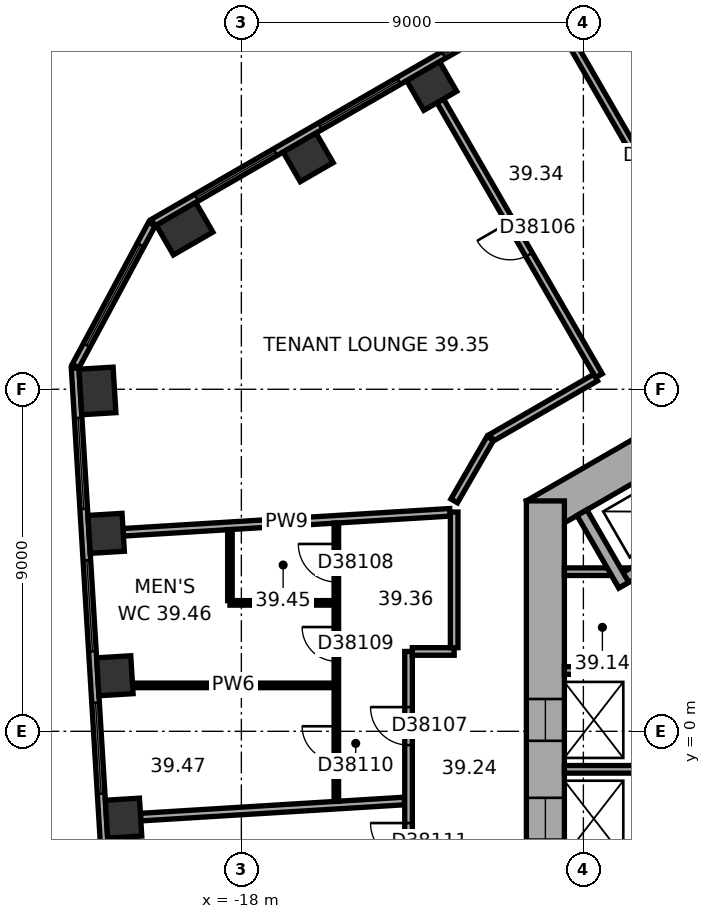
"""IFC4 building model, lengths in metres.
Left out: names, types, materials, properties, quantities, classifications, styles, units other than length and angle.
Written with IfcOpenShell. Run it as: python <this file> out.ifc"""

import sys

from ifc_helpers import new_model, si_unit, direction, frame, frame_2d, origin, origin_2d, place, context, subcontext, project, spatial, rectangle, extrude, element, fill, save


model = new_model("IFC4")
c1 = context("Model", 3, precision=1e-05, world=origin(), true_north=direction((0.0, 1.0)))
c2 = subcontext(c1, "Body", "Model", "MODEL_VIEW")
j1 = project(units=[si_unit("LENGTHUNIT", "METRE"), si_unit("PLANEANGLEUNIT", "RADIAN")], contexts=[c1])
p1 = place(None, origin())
s1 = spatial("IfcSite", under=j1, at=p1, CompositionType="ELEMENT")
p2 = place(p1, origin())
s2 = spatial("IfcBuilding", under=s1, at=p2, CompositionType="ELEMENT")
p3 = place(p2, frame((0.0, 0.0, 161.4)))
s3 = spatial("IfcBuildingStorey", under=s2, at=p3, CompositionType="ELEMENT", Elevation=161.4)
for number, where, z_axis, x_axis in (
    (1, (-12.991, 16.979, 0.0), (0.0, 0.0, 1.0), (-0.866, -0.5, 0.0)),
    (2, (-16.242, 15.102, 0.0), (0.0, 0.0, 1.0), (-0.866, -0.5, 0.0)),
):
    element("IfcColumn", number, at=place(p3, frame(where, z_axis=z_axis, x_axis=x_axis)), inside=s3, PredefinedType="COLUMN", context=c2, shape_type="SweptSolid", body=[
        extrude(rectangle(XDim=1.0, YDim=0.9, at=origin_2d()), origin(), (0.0, 0.0, 1.0), 3.7),
    ])
for number, where, z_axis, x_axis in (
    (3, (-19.494, 13.225, 0.0), (0.0, 0.0, 1.0), (-0.866, -0.5, 0.0)),
    (4, (-21.787, 8.956, 0.0), (0.0, 0.0, 1.0), (0.061, -0.998, 0.0)),
):
    element("IfcColumn", number, at=place(p3, frame(where, z_axis=z_axis, x_axis=x_axis)), inside=s3, PredefinedType="COLUMN", context=c2, shape_type="SweptSolid", body=[
        extrude(rectangle(XDim=1.2, YDim=0.9, at=origin_2d()), origin(), (0.0, 0.0, 1.0), 3.7),
    ])
for number, where, z_axis, x_axis in (
    (5, (-21.558, 5.209, 0.0), (0.0, 0.0, 1.0), (0.061, -0.998, 0.0)),
    (6, (-21.329, 1.462, 0.0), (0.0, 0.0, 1.0), (0.061, -0.998, 0.0)),
    (7, (-21.1, -2.285, 0.0), (0.0, 0.0, 1.0), (0.061, -0.998, 0.0)),
):
    element("IfcColumn", number, at=place(p3, frame(where, z_axis=z_axis, x_axis=x_axis)), inside=s3, PredefinedType="COLUMN", context=c2, shape_type="SweptSolid", body=[
        extrude(rectangle(XDim=1.0, YDim=0.9, at=origin_2d()), origin(), (0.0, 0.0, 1.0), 3.7),
    ])
p4 = place(p3, frame((0.25, 11.691, 0.0), z_axis=(0.0, 0.0, 1.0), x_axis=(-0.866022616891, -0.50000482701, 0.0)))
e8 = element("IfcWall", 8, at=p4, inside=s3, PredefinedType="SHEAR", context=c2, shape_type="SweptSolid", body=[
    extrude(rectangle(XDim=12.125, YDim=1.0, at=frame_2d((6.062, 0.0))), origin(), (0.0, 0.0, 1.0), 3.7),
])
p5 = place(p4, frame((6.262, 0.0, 0.0)))
e9 = element("IfcOpeningElement", 9, at=p5, cuts=e8, PredefinedType="OPENING", context=c2, shape_type="SweptSolid", body=[
    extrude(rectangle(XDim=1.5, YDim=2.1, at=frame_2d((0.75, 1.05))), frame((0.0, 0.51, 0.0), z_axis=(0.0, -1.0, 0.0), x_axis=(1.0, 0.0, 0.0)), (0.0, 0.0, 1.0), 1.02),
])
p6 = place(p4, frame((3.112, 0.0, 0.0)))
e10 = element("IfcOpeningElement", 10, at=p6, cuts=e8, PredefinedType="OPENING", context=c2, shape_type="SweptSolid", body=[
    extrude(rectangle(XDim=0.9, YDim=2.1, at=frame_2d((0.45, 1.05))), frame((0.0, 0.51, 0.0), z_axis=(0.0, -1.0, 0.0), x_axis=(1.0, 0.0, 0.0)), (0.0, 0.0, 1.0), 1.02),
])
p7 = place(p3, frame((-10.0, 6.062, 0.0), z_axis=(0.0, 0.0, 1.0), x_axis=(0.0, -1.0, 0.0)))
e11 = element("IfcWall", 11, at=p7, inside=s3, PredefinedType="SHEAR", context=c2, shape_type="SweptSolid", body=[
    extrude(rectangle(XDim=12.125, YDim=1.0, at=frame_2d((6.062, 0.0))), origin(), (0.0, 0.0, 1.0), 3.7),
])
p8 = place(p7, frame((5.212, 0.0, 0.0)))
e12 = element("IfcOpeningElement", 12, at=p8, cuts=e11, PredefinedType="OPENING", context=c2, shape_type="SweptSolid", body=[
    extrude(rectangle(XDim=1.1, YDim=2.1, at=frame_2d((0.55, 1.05))), frame((0.0, 0.51, 0.0), z_axis=(0.0, -1.0, 0.0), x_axis=(1.0, 0.0, 0.0)), (0.0, 0.0, 1.0), 1.02),
])
p9 = place(p7, frame((7.812, 0.0, 0.0)))
e13 = element("IfcOpeningElement", 13, at=p9, cuts=e11, PredefinedType="OPENING", context=c2, shape_type="SweptSolid", body=[
    extrude(rectangle(XDim=1.1, YDim=2.1, at=frame_2d((0.55, 1.05))), frame((0.0, 0.51, 0.0), z_axis=(0.0, -1.0, 0.0), x_axis=(1.0, 0.0, 0.0)), (0.0, 0.0, 1.0), 1.02),
])
p10 = place(p3, frame((-2.961, 23.405, 0.0), z_axis=(0.0, 0.0, 1.0), x_axis=(-0.866023315909, -0.500003616288, 0.0)))
e14 = element("IfcWall", 14, at=p10, inside=s3, PredefinedType="STANDARD", context=c2, shape_type="SweptSolid", body=[
    extrude(rectangle(XDim=20.044, YDim=0.2, at=frame_2d((10.022, 0.0))), origin(), (0.0, 0.0, 1.0), 3.7),
])
p11 = place(p10, frame((1.314, 0.0, 0.9)))
e15 = element("IfcOpeningElement", 15, at=p11, cuts=e14, PredefinedType="OPENING", context=c2, shape_type="SweptSolid", body=[
    extrude(rectangle(XDim=2.4, YDim=2.0, at=frame_2d((1.2, 1.0))), frame((0.0, 0.11, 0.0), z_axis=(0.0, -1.0, 0.0), x_axis=(1.0, 0.0, 0.0)), (0.0, 0.0, 1.0), 0.22),
])
p12 = place(p10, frame((5.069, 0.0, 0.9)))
e16 = element("IfcOpeningElement", 16, at=p12, cuts=e14, PredefinedType="OPENING", context=c2, shape_type="SweptSolid", body=[
    extrude(rectangle(XDim=2.4, YDim=2.0, at=frame_2d((1.2, 1.0))), frame((0.0, 0.11, 0.0), z_axis=(0.0, -1.0, 0.0), x_axis=(1.0, 0.0, 0.0)), (0.0, 0.0, 1.0), 0.22),
])
p13 = place(p10, frame((8.823, 0.0, 0.9)))
e17 = element("IfcOpeningElement", 17, at=p13, cuts=e14, PredefinedType="OPENING", context=c2, shape_type="SweptSolid", body=[
    extrude(rectangle(XDim=2.4, YDim=2.0, at=frame_2d((1.2, 1.0))), frame((0.0, 0.11, 0.0), z_axis=(0.0, -1.0, 0.0), x_axis=(1.0, 0.0, 0.0)), (0.0, 0.0, 1.0), 0.22),
])
p14 = place(p10, frame((12.577, 0.0, 0.9)))
e18 = element("IfcOpeningElement", 18, at=p14, cuts=e14, PredefinedType="OPENING", context=c2, shape_type="SweptSolid", body=[
    extrude(rectangle(XDim=2.4, YDim=2.0, at=frame_2d((1.2, 1.0))), frame((0.0, 0.11, 0.0), z_axis=(0.0, -1.0, 0.0), x_axis=(1.0, 0.0, 0.0)), (0.0, 0.0, 1.0), 0.22),
])
p15 = place(p10, frame((16.331, 0.0, 0.9)))
e19 = element("IfcOpeningElement", 19, at=p15, cuts=e14, PredefinedType="OPENING", context=c2, shape_type="SweptSolid", body=[
    extrude(rectangle(XDim=2.4, YDim=2.0, at=frame_2d((1.2, 1.0))), frame((0.0, 0.11, 0.0), z_axis=(0.0, -1.0, 0.0), x_axis=(1.0, 0.0, 0.0)), (0.0, 0.0, 1.0), 0.22),
])
p16 = place(p3, frame((-20.357, 13.344, 0.0), z_axis=(0.0, 0.0, 1.0), x_axis=(-0.473288913494, -0.880907262068, 0.0)))
e20 = element("IfcWall", 20, at=p16, inside=s3, PredefinedType="STANDARD", context=c2, shape_type="SweptSolid", body=[
    extrude(rectangle(XDim=4.238, YDim=0.2, at=frame_2d((2.119, 0.0))), origin(), (0.0, 0.0, 1.0), 3.7),
])
p17 = place(p16, frame((0.619, 0.0, 0.9)))
e21 = element("IfcOpeningElement", 21, at=p17, cuts=e20, PredefinedType="OPENING", context=c2, shape_type="SweptSolid", body=[
    extrude(rectangle(XDim=3.0, YDim=2.0, at=frame_2d((1.5, 1.0))), frame((0.0, 0.11, 0.0), z_axis=(0.0, -1.0, 0.0), x_axis=(1.0, 0.0, 0.0)), (0.0, 0.0, 1.0), 0.22),
])
p18 = place(p3, frame((-22.375, 9.557, 0.0), z_axis=(0.0, 0.0, 1.0), x_axis=(0.061036015339, -0.998135564356, 0.0)))
e22 = element("IfcWall", 22, at=p18, inside=s3, PredefinedType="STANDARD", context=c2, shape_type="SweptSolid", body=[
    extrude(rectangle(XDim=20.044, YDim=0.2, at=frame_2d((10.022, 0.0))), origin(), (0.0, 0.0, 1.0), 3.7),
])
p19 = place(p18, frame((1.313, 0.0, 0.9)))
e23 = element("IfcOpeningElement", 23, at=p19, cuts=e22, PredefinedType="OPENING", context=c2, shape_type="SweptSolid", body=[
    extrude(rectangle(XDim=2.4, YDim=2.0, at=frame_2d((1.2, 1.0))), frame((0.0, 0.11, 0.0), z_axis=(0.0, -1.0, 0.0), x_axis=(1.0, 0.0, 0.0)), (0.0, 0.0, 1.0), 0.22),
])
p20 = place(p18, frame((5.067, 0.0, 0.9)))
e24 = element("IfcOpeningElement", 24, at=p20, cuts=e22, PredefinedType="OPENING", context=c2, shape_type="SweptSolid", body=[
    extrude(rectangle(XDim=2.4, YDim=2.0, at=frame_2d((1.2, 1.0))), frame((0.0, 0.11, 0.0), z_axis=(0.0, -1.0, 0.0), x_axis=(1.0, 0.0, 0.0)), (0.0, 0.0, 1.0), 0.22),
])
p21 = place(p18, frame((8.821, 0.0, 0.9)))
e25 = element("IfcOpeningElement", 25, at=p21, cuts=e22, PredefinedType="OPENING", context=c2, shape_type="SweptSolid", body=[
    extrude(rectangle(XDim=2.4, YDim=2.0, at=frame_2d((1.2, 1.0))), frame((0.0, 0.11, 0.0), z_axis=(0.0, -1.0, 0.0), x_axis=(1.0, 0.0, 0.0)), (0.0, 0.0, 1.0), 0.22),
])
p22 = place(p18, frame((12.575, 0.0, 0.9)))
e26 = element("IfcOpeningElement", 26, at=p22, cuts=e22, PredefinedType="OPENING", context=c2, shape_type="SweptSolid", body=[
    extrude(rectangle(XDim=2.4, YDim=2.0, at=frame_2d((1.2, 1.0))), frame((0.0, 0.11, 0.0), z_axis=(0.0, -1.0, 0.0), x_axis=(1.0, 0.0, 0.0)), (0.0, 0.0, 1.0), 0.22),
])
p23 = place(p18, frame((16.329, 0.0, 0.9)))
e27 = element("IfcOpeningElement", 27, at=p23, cuts=e22, PredefinedType="OPENING", context=c2, shape_type="SweptSolid", body=[
    extrude(rectangle(XDim=2.4, YDim=2.0, at=frame_2d((1.2, 1.0))), frame((0.0, 0.11, 0.0), z_axis=(0.0, -1.0, 0.0), x_axis=(1.0, 0.0, 0.0)), (0.0, 0.0, 1.0), 0.22),
])
for number, where, z_axis, x_axis in (
    (28, (-7.3, 4.2, 0.0), (0.0, 0.0, 1.0), (-1.0, 0.0, 0.0)),
    (29, (-7.3, 1.6, 0.0), (0.0, 0.0, 1.0), (-1.0, 0.0, 0.0)),
    (30, (-7.3, -1.0, 0.0), (0.0, 0.0, 1.0), (-1.0, 0.0, 0.0)),
):
    element("IfcWall", number, at=place(p3, frame(where, z_axis=z_axis, x_axis=x_axis)), inside=s3, PredefinedType="PARTITIONING", context=c2, shape_type="SweptSolid", body=[
        extrude(rectangle(XDim=2.2, YDim=0.2, at=frame_2d((1.1, 0.0))), origin(), (0.0, 0.0, 1.0), 3.42),
    ])
p24 = place(p3, frame((-5.24, 5.577, 0.0), z_axis=(0.0, 0.0, 1.0), x_axis=(-0.866014461049, -0.500018952895, 0.0)))
e31 = element("IfcWall", 31, at=p24, inside=s3, PredefinedType="SHEAR", context=c2, shape_type="SweptSolid", body=[
    extrude(rectangle(XDim=3.35, YDim=0.3, at=frame_2d((1.675, 0.0))), origin(), (0.0, 0.0, 1.0), 3.42),
])
p25 = place(p3, frame((-7.937, 3.847, 0.0), z_axis=(0.0, 0.0, 1.0), x_axis=(-0.50002983664, 0.866008176907, 0.0)))
e32 = element("IfcWall", 32, at=p25, inside=s3, PredefinedType="SHEAR", context=c2, shape_type="SweptSolid", body=[
    extrude(rectangle(XDim=2.2, YDim=0.3, at=frame_2d((1.1, 0.0))), origin(), (0.0, 0.0, 1.0), 3.42),
])
p26 = place(p3, frame((-21.109, 5.237, 0.0), z_axis=(0.0, 0.0, 1.0), x_axis=(0.998135264293, 0.061040922131, 0.0)))
e33 = element("IfcWall", 33, at=p26, inside=s3, PredefinedType="PARTITIONING", context=c2, shape_type="SweptSolid", body=[
    extrude(rectangle(XDim=8.615, YDim=0.2, at=frame_2d((4.308, 0.0))), origin(), (0.0, 0.0, 1.0), 3.42),
])
p27 = place(p3, frame((-20.863, 1.208, 0.0), z_axis=(0.0, 0.0, 1.0), x_axis=(1.0, 0.0, 0.0)))
e34 = element("IfcWall", 34, at=p27, inside=s3, PredefinedType="PARTITIONING", context=c2, shape_type="SweptSolid", body=[
    extrude(rectangle(XDim=5.302, YDim=0.12, at=frame_2d((2.651, 0.0))), origin(), (0.0, 0.0, 1.0), 2.87),
])
p28 = place(p3, frame((-20.651, -2.258, 0.0), z_axis=(0.0, 0.0, 1.0), x_axis=(0.998133960965, 0.061062230286, 0.0)))
e35 = element("IfcWall", 35, at=p28, inside=s3, PredefinedType="PARTITIONING", context=c2, shape_type="SweptSolid", body=[
    extrude(rectangle(XDim=6.953, YDim=0.2, at=frame_2d((3.477, 0.0))), origin(), (0.0, 0.0, 1.0), 3.42),
])
p29 = place(p3, frame((-18.301, 3.38, 0.0), z_axis=(0.0, 0.0, 1.0), x_axis=(1.0, 0.0, 0.0)))
e36 = element("IfcWall", 36, at=p29, inside=s3, PredefinedType="PARTITIONING", context=c2, shape_type="SweptSolid", body=[
    extrude(rectangle(XDim=2.74, YDim=0.12, at=frame_2d((1.37, 0.0))), origin(), (0.0, 0.0, 1.0), 3.42),
])
p30 = place(p3, frame((-18.301, 5.308, 0.0), z_axis=(0.0, 0.0, 1.0), x_axis=(0.0, -1.0, 0.0)))
e37 = element("IfcWall", 37, at=p30, inside=s3, PredefinedType="PARTITIONING", context=c2, shape_type="SweptSolid", body=[
    extrude(rectangle(XDim=1.869, YDim=0.12, at=frame_2d((0.934, 0.0))), origin(), (0.0, 0.0, 1.0), 3.42),
])
p31 = place(p3, frame((-15.501, 5.479, 0.0), z_axis=(0.0, 0.0, 1.0), x_axis=(0.0, -1.0, 0.0)))
e38 = element("IfcWall", 38, at=p31, inside=s3, PredefinedType="PARTITIONING", context=c2, shape_type="SweptSolid", body=[
    extrude(rectangle(XDim=7.322, YDim=0.12, at=frame_2d((3.661, 0.0))), origin(), (0.0, 0.0, 1.0), 3.42),
])
p32 = place(p31, frame((0.55, 0.0, 0.0)))
e39 = element("IfcOpeningElement", 39, at=p32, cuts=e38, PredefinedType="OPENING", context=c2, shape_type="SweptSolid", body=[
    extrude(rectangle(XDim=1.0, YDim=2.1, at=frame_2d((0.5, 1.05))), frame((0.0, 0.07, 0.0), z_axis=(0.0, -1.0, 0.0), x_axis=(1.0, 0.0, 0.0)), (0.0, 0.0, 1.0), 0.14),
])
p33 = place(p31, frame((2.736, 0.0, 0.0)))
e40 = element("IfcOpeningElement", 40, at=p33, cuts=e38, PredefinedType="OPENING", context=c2, shape_type="SweptSolid", body=[
    extrude(rectangle(XDim=0.9, YDim=2.1, at=frame_2d((0.45, 1.05))), frame((0.0, 0.07, 0.0), z_axis=(0.0, -1.0, 0.0), x_axis=(1.0, 0.0, 0.0)), (0.0, 0.0, 1.0), 0.14),
])
p34 = place(p31, frame((5.347, 0.0, 0.0)))
e41 = element("IfcOpeningElement", 41, at=p34, cuts=e38, PredefinedType="OPENING", context=c2, shape_type="SweptSolid", body=[
    extrude(rectangle(XDim=0.9, YDim=2.1, at=frame_2d((0.45, 1.05))), frame((0.0, 0.07, 0.0), z_axis=(0.0, -1.0, 0.0), x_axis=(1.0, 0.0, 0.0)), (0.0, 0.0, 1.0), 0.14),
])
p35 = place(p3, frame((-13.601, 2.101, 0.0), z_axis=(0.0, 0.0, 1.0), x_axis=(0.0, -1.0, 0.0)))
e42 = element("IfcWall", 42, at=p35, inside=s3, PredefinedType="PARTITIONING", context=c2, shape_type="SweptSolid", body=[
    extrude(rectangle(XDim=6.102, YDim=0.2, at=frame_2d((3.051, 0.0))), origin(), (0.0, 0.0, 1.0), 3.42),
])
p36 = place(p35, frame((1.464, 0.0, 0.0)))
e43 = element("IfcOpeningElement", 43, at=p36, cuts=e42, PredefinedType="OPENING", context=c2, shape_type="SweptSolid", body=[
    extrude(rectangle(XDim=1.0, YDim=2.1, at=frame_2d((0.5, 1.05))), frame((0.0, 0.11, 0.0), z_axis=(0.0, -1.0, 0.0), x_axis=(1.0, 0.0, 0.0)), (0.0, 0.0, 1.0), 0.22),
])
p37 = place(p35, frame((4.515, 0.0, 0.0)))
e44 = element("IfcOpeningElement", 44, at=p37, cuts=e42, PredefinedType="OPENING", context=c2, shape_type="SweptSolid", body=[
    extrude(rectangle(XDim=1.0, YDim=2.1, at=frame_2d((0.5, 1.05))), frame((0.0, 0.11, 0.0), z_axis=(0.0, -1.0, 0.0), x_axis=(1.0, 0.0, 0.0)), (0.0, 0.0, 1.0), 0.22),
])
p38 = place(p3, frame((-12.766, 16.589, 0.0), z_axis=(0.0, 0.0, 1.0), x_axis=(0.500010139422, -0.866019549707, 0.0)))
e45 = element("IfcWall", 45, at=p38, inside=s3, PredefinedType="PARTITIONING", context=c2, shape_type="SweptSolid", body=[
    extrude(rectangle(XDim=8.35, YDim=0.2, at=frame_2d((4.175, 0.0))), origin(), (0.0, 0.0, 1.0), 3.42),
])
p39 = place(p38, frame((3.675, 0.0, 0.0)))
e46 = element("IfcOpeningElement", 46, at=p39, cuts=e45, PredefinedType="OPENING", context=c2, shape_type="SweptSolid", body=[
    extrude(rectangle(XDim=1.0, YDim=2.1, at=frame_2d((0.5, 1.05))), frame((0.0, 0.11, 0.0), z_axis=(0.0, -1.0, 0.0), x_axis=(1.0, 0.0, 0.0)), (0.0, 0.0, 1.0), 0.22),
])
p40 = place(p3, frame((-12.4, 2.101, 0.0), z_axis=(0.0, 0.0, 1.0), x_axis=(-1.0, 0.0, 0.0)))
e47 = element("IfcWall", 47, at=p40, inside=s3, PredefinedType="PARTITIONING", context=c2, shape_type="SweptSolid", body=[
    extrude(rectangle(XDim=1.101, YDim=0.2, at=frame_2d((0.551, 0.0))), origin(), (0.0, 0.0, 1.0), 3.42),
])
p41 = place(p3, frame((-12.4, 5.769, 0.0), z_axis=(0.0, 0.0, 1.0), x_axis=(0.0, -1.0, 0.0)))
e48 = element("IfcWall", 48, at=p41, inside=s3, PredefinedType="PARTITIONING", context=c2, shape_type="SweptSolid", body=[
    extrude(rectangle(XDim=3.568, YDim=0.2, at=frame_2d((1.784, 0.0))), origin(), (0.0, 0.0, 1.0), 3.42),
])
p42 = place(p3, frame((-11.45, 7.708, 0.0), z_axis=(0.0, 0.0, 1.0), x_axis=(-0.500022797313, -0.86601224135, 0.0)))
e49 = element("IfcWall", 49, at=p42, inside=s3, PredefinedType="PARTITIONING", context=c2, shape_type="SweptSolid", body=[
    extrude(rectangle(XDim=1.9, YDim=0.2, at=frame_2d((0.95, 0.0))), origin(), (0.0, 0.0, 1.0), 3.42),
])
p43 = place(p3, frame((-9.515, 18.466, 0.0), z_axis=(0.0, 0.0, 1.0), x_axis=(0.500010139422, -0.866019549707, 0.0)))
e50 = element("IfcWall", 50, at=p43, inside=s3, PredefinedType="PARTITIONING", context=c2, shape_type="SweptSolid", body=[
    extrude(rectangle(XDim=8.35, YDim=0.2, at=frame_2d((4.175, 0.0))), origin(), (0.0, 0.0, 1.0), 2.87),
])
p44 = place(p43, frame((3.675, 0.0, 0.0)))
e51 = element("IfcOpeningElement", 51, at=p44, cuts=e50, PredefinedType="OPENING", context=c2, shape_type="SweptSolid", body=[
    extrude(rectangle(XDim=1.0, YDim=2.1, at=frame_2d((0.5, 1.05))), frame((0.0, 0.11, 0.0), z_axis=(0.0, -1.0, 0.0), x_axis=(1.0, 0.0, 0.0)), (0.0, 0.0, 1.0), 0.22),
])
p45 = place(p3, frame((-8.678, 9.308, 0.0), z_axis=(0.0, 0.0, 1.0), x_axis=(-0.866000359435, -0.500043375578, 0.0)))
e52 = element("IfcWall", 52, at=p45, inside=s3, PredefinedType="PARTITIONING", context=c2, shape_type="SweptSolid", body=[
    extrude(rectangle(XDim=3.161, YDim=0.2, at=frame_2d((1.581, 0.0))), origin(), (0.0, 0.0, 1.0), 3.42),
])
p46 = place(p13, origin())
e53 = element("IfcWindow", 53, at=p46, inside=s3, PartitioningType="SINGLE_PANEL", PredefinedType="WINDOW", context=c2, shape_type="SweptSolid", body=[
    extrude(rectangle(XDim=2.4, YDim=2.0, at=frame_2d((1.2, 1.0))), frame((0.0, 0.03, 0.0), z_axis=(0.0, -1.0, 0.0), x_axis=(1.0, 0.0, 0.0)), (0.0, 0.0, 1.0), 0.06),
])
fill(e17, e53)
p47 = place(p14, origin())
e54 = element("IfcWindow", 54, at=p47, inside=s3, PartitioningType="SINGLE_PANEL", PredefinedType="WINDOW", context=c2, shape_type="SweptSolid", body=[
    extrude(rectangle(XDim=2.4, YDim=2.0, at=frame_2d((1.2, 1.0))), frame((0.0, 0.03, 0.0), z_axis=(0.0, -1.0, 0.0), x_axis=(1.0, 0.0, 0.0)), (0.0, 0.0, 1.0), 0.06),
])
fill(e18, e54)
p48 = place(p15, origin())
e55 = element("IfcWindow", 55, at=p48, inside=s3, PartitioningType="SINGLE_PANEL", PredefinedType="WINDOW", context=c2, shape_type="SweptSolid", body=[
    extrude(rectangle(XDim=2.4, YDim=2.0, at=frame_2d((1.2, 1.0))), frame((0.0, 0.03, 0.0), z_axis=(0.0, -1.0, 0.0), x_axis=(1.0, 0.0, 0.0)), (0.0, 0.0, 1.0), 0.06),
])
fill(e19, e55)
p49 = place(p17, origin())
e56 = element("IfcWindow", 56, at=p49, inside=s3, PartitioningType="SINGLE_PANEL", PredefinedType="WINDOW", context=c2, shape_type="SweptSolid", body=[
    extrude(rectangle(XDim=3.0, YDim=2.0, at=frame_2d((1.5, 1.0))), frame((0.0, 0.03, 0.0), z_axis=(0.0, -1.0, 0.0), x_axis=(1.0, 0.0, 0.0)), (0.0, 0.0, 1.0), 0.06),
])
fill(e21, e56)
p50 = place(p19, origin())
e57 = element("IfcWindow", 57, at=p50, inside=s3, PartitioningType="SINGLE_PANEL", PredefinedType="WINDOW", context=c2, shape_type="SweptSolid", body=[
    extrude(rectangle(XDim=2.4, YDim=2.0, at=frame_2d((1.2, 1.0))), frame((0.0, 0.03, 0.0), z_axis=(0.0, -1.0, 0.0), x_axis=(1.0, 0.0, 0.0)), (0.0, 0.0, 1.0), 0.06),
])
fill(e23, e57)
p51 = place(p20, origin())
e58 = element("IfcWindow", 58, at=p51, inside=s3, PartitioningType="SINGLE_PANEL", PredefinedType="WINDOW", context=c2, shape_type="SweptSolid", body=[
    extrude(rectangle(XDim=2.4, YDim=2.0, at=frame_2d((1.2, 1.0))), frame((0.0, 0.03, 0.0), z_axis=(0.0, -1.0, 0.0), x_axis=(1.0, 0.0, 0.0)), (0.0, 0.0, 1.0), 0.06),
])
fill(e24, e58)
p52 = place(p21, origin())
e59 = element("IfcWindow", 59, at=p52, inside=s3, PartitioningType="SINGLE_PANEL", PredefinedType="WINDOW", context=c2, shape_type="SweptSolid", body=[
    extrude(rectangle(XDim=2.4, YDim=2.0, at=frame_2d((1.2, 1.0))), frame((0.0, 0.03, 0.0), z_axis=(0.0, -1.0, 0.0), x_axis=(1.0, 0.0, 0.0)), (0.0, 0.0, 1.0), 0.06),
])
fill(e25, e59)
p53 = place(p8, origin())
e60 = element("IfcDoor", 60, at=p53, inside=s3, OperationType="DOUBLE_DOOR_SLIDING", PredefinedType="DOOR", context=c2, shape_type="SweptSolid", body=[
    extrude(rectangle(XDim=1.1, YDim=2.1, at=frame_2d((0.55, 1.05))), frame((0.0, 0.025, 0.0), z_axis=(0.0, -1.0, 0.0), x_axis=(1.0, 0.0, 0.0)), (0.0, 0.0, 1.0), 0.05),
])
fill(e12, e60)
p54 = place(p9, origin())
e61 = element("IfcDoor", 61, at=p54, inside=s3, OperationType="DOUBLE_DOOR_SLIDING", PredefinedType="DOOR", context=c2, shape_type="SweptSolid", body=[
    extrude(rectangle(XDim=1.1, YDim=2.1, at=frame_2d((0.55, 1.05))), frame((0.0, 0.025, 0.0), z_axis=(0.0, -1.0, 0.0), x_axis=(1.0, 0.0, 0.0)), (0.0, 0.0, 1.0), 0.05),
])
fill(e13, e61)
p55 = place(p39, origin())
e62 = element("IfcDoor", 62, at=p55, inside=s3, OperationType="SINGLE_SWING_LEFT", PredefinedType="DOOR", context=c2, shape_type="SweptSolid", body=[
    extrude(rectangle(XDim=1.0, YDim=2.1, at=frame_2d((0.5, 1.05))), frame((0.0, 0.025, 0.0), z_axis=(0.0, -1.0, 0.0), x_axis=(1.0, 0.0, 0.0)), (0.0, 0.0, 1.0), 0.05),
])
fill(e46, e62)
p56 = place(p36, origin())
e63 = element("IfcDoor", 63, at=p56, inside=s3, OperationType="SINGLE_SWING_LEFT", PredefinedType="DOOR", context=c2, shape_type="SweptSolid", body=[
    extrude(rectangle(XDim=1.0, YDim=2.1, at=frame_2d((0.5, 1.05))), frame((0.0, 0.025, 0.0), z_axis=(0.0, -1.0, 0.0), x_axis=(1.0, 0.0, 0.0)), (0.0, 0.0, 1.0), 0.05),
])
fill(e43, e63)
p57 = place(p32, origin())
e64 = element("IfcDoor", 64, at=p57, inside=s3, OperationType="SINGLE_SWING_LEFT", PredefinedType="DOOR", context=c2, shape_type="SweptSolid", body=[
    extrude(rectangle(XDim=1.0, YDim=2.1, at=frame_2d((0.5, 1.05))), frame((0.0, 0.025, 0.0), z_axis=(0.0, -1.0, 0.0), x_axis=(1.0, 0.0, 0.0)), (0.0, 0.0, 1.0), 0.05),
])
fill(e39, e64)
p58 = place(p33, origin())
e65 = element("IfcDoor", 65, at=p58, inside=s3, OperationType="SINGLE_SWING_LEFT", PredefinedType="DOOR", context=c2, shape_type="SweptSolid", body=[
    extrude(rectangle(XDim=0.9, YDim=2.1, at=frame_2d((0.45, 1.05))), frame((0.0, 0.025, 0.0), z_axis=(0.0, -1.0, 0.0), x_axis=(1.0, 0.0, 0.0)), (0.0, 0.0, 1.0), 0.05),
])
fill(e40, e65)
p59 = place(p34, origin())
e66 = element("IfcDoor", 66, at=p59, inside=s3, OperationType="SINGLE_SWING_LEFT", PredefinedType="DOOR", context=c2, shape_type="SweptSolid", body=[
    extrude(rectangle(XDim=0.9, YDim=2.1, at=frame_2d((0.45, 1.05))), frame((0.0, 0.025, 0.0), z_axis=(0.0, -1.0, 0.0), x_axis=(1.0, 0.0, 0.0)), (0.0, 0.0, 1.0), 0.05),
])
fill(e41, e66)
p60 = place(p37, origin())
e67 = element("IfcDoor", 67, at=p60, inside=s3, OperationType="SINGLE_SWING_LEFT", PredefinedType="DOOR", context=c2, shape_type="SweptSolid", body=[
    extrude(rectangle(XDim=1.0, YDim=2.1, at=frame_2d((0.5, 1.05))), frame((0.0, 0.025, 0.0), z_axis=(0.0, -1.0, 0.0), x_axis=(1.0, 0.0, 0.0)), (0.0, 0.0, 1.0), 0.05),
])
fill(e44, e67)
save(model, sys.argv[1])
